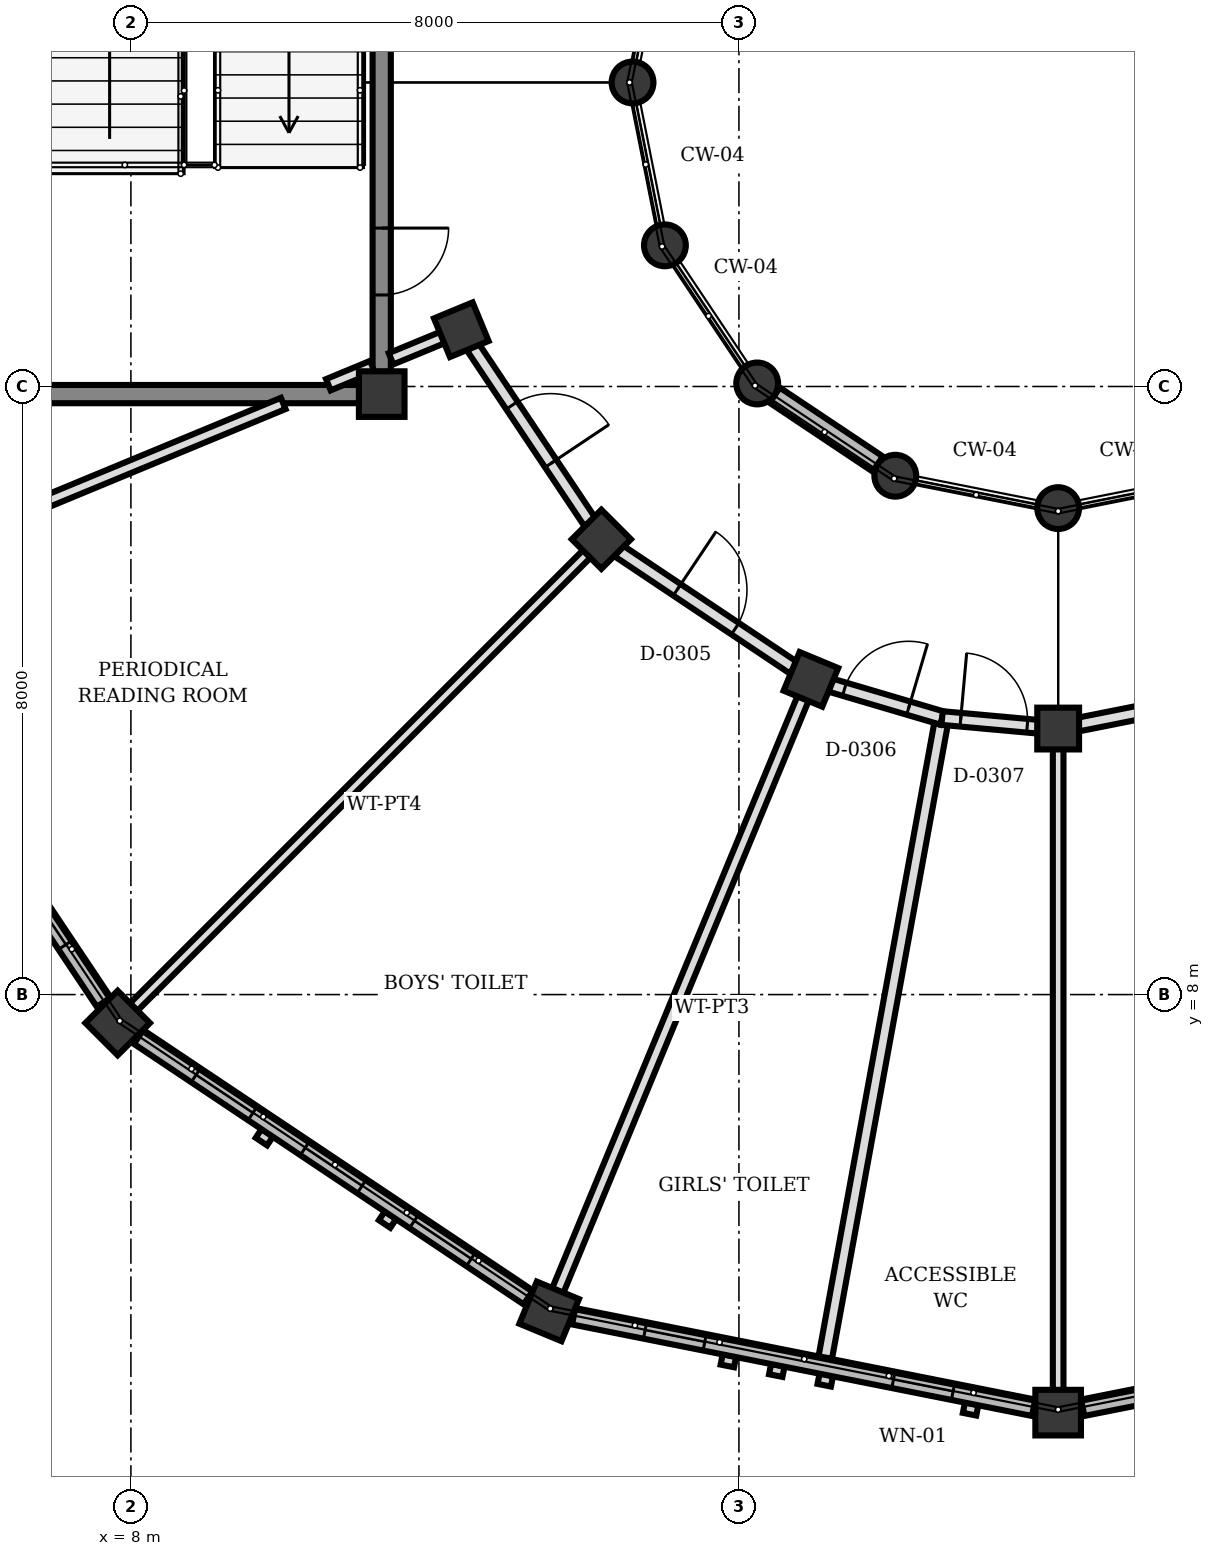
"""IFC4 building model, lengths in metres.
Left out: names, types, materials, properties, quantities, classifications, styles, units other than length and angle.
Written with IfcOpenShell. Run it as: python <this file> out.ifc"""

import sys

from ifc_helpers import new_model, si_unit, direction, frame, frame_2d, origin, origin_2d, place, context, subcontext, project, spatial, rectangle, circle, extrude, element, fill, save


model = new_model("IFC4")
c1 = context("Model", 3, precision=1e-05, world=origin(), true_north=direction((0.0, 1.0)))
c2 = subcontext(c1, "Body", "Model", "MODEL_VIEW")
j1 = project(units=[si_unit("LENGTHUNIT", "METRE"), si_unit("PLANEANGLEUNIT", "RADIAN")], contexts=[c1])
p1 = place(None, origin())
s1 = spatial("IfcSite", under=j1, at=p1, CompositionType="ELEMENT")
p2 = place(p1, origin())
s2 = spatial("IfcBuilding", under=s1, at=p2, CompositionType="ELEMENT")
p3 = place(p2, frame((0.0, 0.0, 8.5)))
s3 = spatial("IfcBuildingStorey", under=s2, at=p3, CompositionType="ELEMENT", Elevation=8.5)
p4 = place(p3, frame((11.3, 15.9, 0.0), z_axis=(0.0, 0.0, 1.0), x_axis=(1.0, 0.0, 0.0)))
e1 = element("IfcColumn", 1, at=p4, inside=s3, PredefinedType="COLUMN", context=c2, shape_type="SweptSolid", body=[
    extrude(rectangle(XDim=0.6, YDim=0.6, at=origin_2d()), origin(), (0.0, 0.0, 1.0), 4.0),
])
for number, where, z_axis, x_axis in (
    (2, (14.6, 20.0, 0.0), (0.0, 0.0, 1.0), (1.0, 0.0, 0.0)),
    (3, (15.026, 17.857, 0.0), (0.0, 0.0, 1.0), (1.0, 0.0, 0.0)),
    (4, (16.24, 16.04, 0.0), (0.0, 0.0, 1.0), (1.0, 0.0, 0.0)),
    (5, (18.057, 14.826, 0.0), (0.0, 0.0, 1.0), (1.0, 0.0, 0.0)),
    (6, (20.2, 14.4, 0.0), (0.0, 0.0, 1.0), (1.0, 0.0, 0.0)),
):
    element("IfcColumn", number, at=place(p3, frame(where, z_axis=z_axis, x_axis=x_axis)), inside=s3, PredefinedType="COLUMN", context=c2, shape_type="SweptSolid", body=[
        extrude(circle(Radius=0.275, at=origin_2d()), origin(), (0.0, 0.0, 1.0), 4.0),
    ])
for number, where, z_axis, x_axis in (
    (7, (12.347, 16.747, 0.0), (0.0, 0.0, 1.0), (-0.924, -0.383, 0.0)),
    (8, (14.19, 13.99, 0.0), (0.0, 0.0, 1.0), (-0.707, -0.707, 0.0)),
    (9, (16.947, 12.147, 0.0), (0.0, 0.0, 1.0), (-0.383, -0.924, 0.0)),
    (10, (20.2, 11.5, 0.0), (0.0, 0.0, 1.0), (0.0, -1.0, 0.0)),
):
    element("IfcColumn", number, at=place(p3, frame(where, z_axis=z_axis, x_axis=x_axis)), inside=s3, PredefinedType="COLUMN", context=c2, shape_type="SweptSolid", body=[
        extrude(rectangle(XDim=0.55, YDim=0.55, at=origin_2d()), origin(), (0.0, 0.0, 1.0), 4.0),
    ])
for number, where, z_axis, x_axis in (
    (11, (7.826, 7.626, 0.0), (0.0, 0.0, 1.0), (-0.707, -0.707, 0.0)),
    (12, (13.503, 3.832, 0.0), (0.0, 0.0, 1.0), (-0.383, -0.924, 0.0)),
    (13, (20.2, 2.5, 0.0), (0.0, 0.0, 1.0), (0.0, -1.0, 0.0)),
):
    element("IfcColumn", number, at=place(p3, frame(where, z_axis=z_axis, x_axis=x_axis)), inside=s3, PredefinedType="COLUMN", context=c2, shape_type="SweptSolid", body=[
        extrude(rectangle(XDim=0.6, YDim=0.6, at=origin_2d()), origin(), (0.0, 0.0, 1.0), 4.0),
    ])
p5 = place(p3, frame((7.643, 7.9, 0.0), z_axis=(0.0, 0.0, 1.0), x_axis=(-0.555658736667, 0.831410469242, 0.0)))
e14 = element("IfcWall", 14, at=p5, inside=s3, PredefinedType="SOLIDWALL", context=c2, shape_type="SweptSolid", body=[
    extrude(rectangle(XDim=6.169, YDim=0.22, at=frame_2d((3.084, 0.0))), origin(), (0.0, 0.0, 1.0), 3.172),
])
p6 = place(p5, frame((0.907, 0.0, 0.85)))
e15 = element("IfcOpeningElement", 15, at=p6, cuts=e14, PredefinedType="OPENING", context=c2, shape_type="SweptSolid", body=[
    extrude(rectangle(XDim=0.9, YDim=1.4, at=frame_2d((0.45, 0.7))), frame((0.0, 0.12, 0.0), z_axis=(0.0, -1.0, 0.0), x_axis=(1.0, 0.0, 0.0)), (0.0, 0.0, 1.0), 0.24),
])
p7 = place(p5, frame((2.635, 0.0, 0.85)))
e16 = element("IfcOpeningElement", 16, at=p7, cuts=e14, PredefinedType="OPENING", context=c2, shape_type="SweptSolid", body=[
    extrude(rectangle(XDim=0.9, YDim=1.4, at=frame_2d((0.45, 0.7))), frame((0.0, 0.12, 0.0), z_axis=(0.0, -1.0, 0.0), x_axis=(1.0, 0.0, 0.0)), (0.0, 0.0, 1.0), 0.24),
])
p8 = place(p5, frame((4.362, 0.0, 0.85)))
e17 = element("IfcOpeningElement", 17, at=p8, cuts=e14, PredefinedType="OPENING", context=c2, shape_type="SweptSolid", body=[
    extrude(rectangle(XDim=0.9, YDim=1.4, at=frame_2d((0.45, 0.7))), frame((0.0, 0.12, 0.0), z_axis=(0.0, -1.0, 0.0), x_axis=(1.0, 0.0, 0.0)), (0.0, 0.0, 1.0), 0.24),
])
p9 = place(p3, frame((13.229, 4.015, 0.0), z_axis=(0.0, 0.0, 1.0), x_axis=(-0.831379966495, 0.555704374025, 0.0)))
e18 = element("IfcWall", 18, at=p9, inside=s3, PredefinedType="SOLIDWALL", context=c2, shape_type="SweptSolid", body=[
    extrude(rectangle(XDim=6.169, YDim=0.22, at=frame_2d((3.084, 0.0))), origin(), (0.0, 0.0, 1.0), 3.172),
])
p10 = place(p9, frame((0.907, 0.0, 0.85)))
e19 = element("IfcOpeningElement", 19, at=p10, cuts=e18, PredefinedType="OPENING", context=c2, shape_type="SweptSolid", body=[
    extrude(rectangle(XDim=0.9, YDim=1.4, at=frame_2d((0.45, 0.7))), frame((0.0, 0.12, 0.0), z_axis=(0.0, -1.0, 0.0), x_axis=(1.0, 0.0, 0.0)), (0.0, 0.0, 1.0), 0.24),
])
p11 = place(p9, frame((2.635, 0.0, 0.85)))
e20 = element("IfcOpeningElement", 20, at=p11, cuts=e18, PredefinedType="OPENING", context=c2, shape_type="SweptSolid", body=[
    extrude(rectangle(XDim=0.9, YDim=1.4, at=frame_2d((0.45, 0.7))), frame((0.0, 0.12, 0.0), z_axis=(0.0, -1.0, 0.0), x_axis=(1.0, 0.0, 0.0)), (0.0, 0.0, 1.0), 0.24),
])
p12 = place(p9, frame((4.362, 0.0, 0.85)))
e21 = element("IfcOpeningElement", 21, at=p12, cuts=e18, PredefinedType="OPENING", context=c2, shape_type="SweptSolid", body=[
    extrude(rectangle(XDim=0.9, YDim=1.4, at=frame_2d((0.45, 0.7))), frame((0.0, 0.12, 0.0), z_axis=(0.0, -1.0, 0.0), x_axis=(1.0, 0.0, 0.0)), (0.0, 0.0, 1.0), 0.24),
])
p13 = place(p3, frame((16.47, 15.886, 0.0), z_axis=(0.0, 0.0, 1.0), x_axis=(0.83165874011, -0.555287078904, 0.0)))
e22 = element("IfcWall", 22, at=p13, inside=s3, PredefinedType="SOLIDWALL", context=c2, shape_type="SweptSolid", body=[
    extrude(rectangle(XDim=1.632, YDim=0.24, at=frame_2d((0.816, 0.0))), origin(), (0.0, 0.0, 1.0), 3.222),
])
p14 = place(p3, frame((19.877, 2.564, 0.0), z_axis=(0.0, 0.0, 1.0), x_axis=(-0.980770460131, 0.195164813773, 0.0)))
e23 = element("IfcWall", 23, at=p14, inside=s3, PredefinedType="SOLIDWALL", context=c2, shape_type="SweptSolid", body=[
    extrude(rectangle(XDim=6.17, YDim=0.22, at=frame_2d((3.085, 0.0))), origin(), (0.0, 0.0, 1.0), 3.172),
])
p15 = place(p14, frame((1.081, 0.0, 1.15)))
e24 = element("IfcOpeningElement", 24, at=p15, cuts=e23, PredefinedType="OPENING", context=c2, shape_type="SweptSolid", body=[
    extrude(rectangle(XDim=0.8, YDim=1.1, at=frame_2d((0.4, 0.55))), frame((0.0, 0.12, 0.0), z_axis=(0.0, -1.0, 0.0), x_axis=(1.0, 0.0, 0.0)), (0.0, 0.0, 1.0), 0.24),
])
p16 = place(p14, frame((4.412, 0.0, 1.15)))
e25 = element("IfcOpeningElement", 25, at=p16, cuts=e23, PredefinedType="OPENING", context=c2, shape_type="SweptSolid", body=[
    extrude(rectangle(XDim=0.8, YDim=1.1, at=frame_2d((0.4, 0.55))), frame((0.0, 0.12, 0.0), z_axis=(0.0, -1.0, 0.0), x_axis=(1.0, 0.0, 0.0)), (0.0, 0.0, 1.0), 0.24),
])
p17 = place(p3, frame((26.574, 3.768, 0.0), z_axis=(0.0, 0.0, 1.0), x_axis=(-0.980770460131, -0.195164813773, 0.0)))
e26 = element("IfcWall", 26, at=p17, inside=s3, PredefinedType="SOLIDWALL", context=c2, shape_type="SweptSolid", body=[
    extrude(rectangle(XDim=6.17, YDim=0.22, at=frame_2d((3.085, 0.0))), origin(), (0.0, 0.0, 1.0), 3.172),
])
p18 = place(p17, frame((0.907, 0.0, 0.85)))
e27 = element("IfcOpeningElement", 27, at=p18, cuts=e26, PredefinedType="OPENING", context=c2, shape_type="SweptSolid", body=[
    extrude(rectangle(XDim=0.9, YDim=1.4, at=frame_2d((0.45, 0.7))), frame((0.0, 0.12, 0.0), z_axis=(0.0, -1.0, 0.0), x_axis=(1.0, 0.0, 0.0)), (0.0, 0.0, 1.0), 0.24),
])
p19 = place(p17, frame((2.635, 0.0, 0.85)))
e28 = element("IfcOpeningElement", 28, at=p19, cuts=e26, PredefinedType="OPENING", context=c2, shape_type="SweptSolid", body=[
    extrude(rectangle(XDim=0.9, YDim=1.4, at=frame_2d((0.45, 0.7))), frame((0.0, 0.12, 0.0), z_axis=(0.0, -1.0, 0.0), x_axis=(1.0, 0.0, 0.0)), (0.0, 0.0, 1.0), 0.24),
])
p20 = place(p17, frame((4.362, 0.0, 0.85)))
e29 = element("IfcOpeningElement", 29, at=p20, cuts=e26, PredefinedType="OPENING", context=c2, shape_type="SweptSolid", body=[
    extrude(rectangle(XDim=0.9, YDim=1.4, at=frame_2d((0.45, 0.7))), frame((0.0, 0.12, 0.0), z_axis=(0.0, -1.0, 0.0), x_axis=(1.0, 0.0, 0.0)), (0.0, 0.0, 1.0), 0.24),
])
p21 = place(p3, frame((11.3, 24.328, 0.0), z_axis=(0.0, 0.0, 1.0), x_axis=(0.0, -1.0, 0.0)))
e30 = element("IfcWall", 30, at=p21, inside=s3, PredefinedType="SHEAR", context=c2, shape_type="SweptSolid", body=[
    extrude(rectangle(XDim=8.136, YDim=0.24, at=frame_2d((4.068, 0.0))), origin(), (0.0, 0.0, 1.0), 3.74),
])
p22 = place(p21, frame((6.244, 0.0, 0.0)))
e31 = element("IfcOpeningElement", 31, at=p22, cuts=e30, PredefinedType="OPENING", context=c2, shape_type="SweptSolid", body=[
    extrude(rectangle(XDim=0.88, YDim=2.1, at=frame_2d((0.44, 1.05))), frame((0.0, 0.13, 0.0), z_axis=(0.0, -1.0, 0.0), x_axis=(1.0, 0.0, 0.0)), (0.0, 0.0, 1.0), 0.26),
])
p23 = place(p3, frame((11.008, 15.9, 0.0), z_axis=(0.0, 0.0, 1.0), x_axis=(-1.0, 0.0, 0.0)))
e32 = element("IfcWall", 32, at=p23, inside=s3, PredefinedType="SHEAR", context=c2, shape_type="SweptSolid", body=[
    extrude(rectangle(XDim=4.216, YDim=0.24, at=frame_2d((2.108, 0.0))), origin(), (0.0, 0.0, 1.0), 3.74),
])
p24 = place(p3, frame((12.1, 16.645, 0.0), z_axis=(0.0, 0.0, 1.0), x_axis=(-0.924069600435, -0.382224245113, 0.0)))
e33 = element("IfcWall", 33, at=p24, inside=s3, PredefinedType="PARTITIONING", context=c2, shape_type="SweptSolid", body=[
    extrude(rectangle(XDim=0.733, YDim=0.16, at=frame_2d((0.366, 0.0))), origin(), (0.0, 0.0, 1.0), 3.072),
])
p25 = place(p3, frame((11.177, 16.263, 0.0), z_axis=(0.0, 0.0, 1.0), x_axis=(-0.923812676193, -0.382844797933, 0.0)))
e34 = element("IfcWall", 34, at=p25, inside=s3, PredefinedType="PARTITIONING", context=c2, shape_type="SweptSolid", body=[
    extrude(rectangle(XDim=0.627, YDim=0.16, at=frame_2d((0.313, 0.0))), origin(), (0.0, 0.0, 1.0), 3.072),
])
p26 = place(p3, frame((10.004, 15.777, 0.0), z_axis=(0.0, 0.0, 1.0), x_axis=(-0.923864955254, -0.382718623082, 0.0)))
e35 = element("IfcWall", 35, at=p26, inside=s3, PredefinedType="PARTITIONING", context=c2, shape_type="SweptSolid", body=[
    extrude(rectangle(XDim=6.172, YDim=0.16, at=frame_2d((3.086, 0.0))), origin(), (0.0, 0.0, 1.0), 3.072),
])
p27 = place(p3, frame((14.001, 13.801, 0.0), z_axis=(0.0, 0.0, 1.0), x_axis=(-0.707106781187, -0.707106781187, 0.0)))
e36 = element("IfcWall", 36, at=p27, inside=s3, PredefinedType="PARTITIONING", context=c2, shape_type="SweptSolid", body=[
    extrude(rectangle(XDim=8.441, YDim=0.14, at=frame_2d((4.221, 0.0))), origin(), (0.0, 0.0, 1.0), 3.072),
])
p28 = place(p3, frame((16.845, 11.9, 0.0), z_axis=(0.0, 0.0, 1.0), x_axis=(-0.382683896966, -0.923879340067, 0.0)))
e37 = element("IfcWall", 37, at=p28, inside=s3, PredefinedType="PARTITIONING", context=c2, shape_type="SweptSolid", body=[
    extrude(rectangle(XDim=8.44, YDim=0.16, at=frame_2d((4.22, 0.0))), origin(), (0.0, 0.0, 1.0), 3.072),
])
p29 = place(p3, frame((20.2, 11.233, 0.0), z_axis=(0.0, 0.0, 1.0), x_axis=(0.0, -1.0, 0.0)))
e38 = element("IfcWall", 38, at=p29, inside=s3, PredefinedType="PARTITIONING", context=c2, shape_type="SweptSolid", body=[
    extrude(rectangle(XDim=8.441, YDim=0.14, at=frame_2d((4.22, 0.0))), origin(), (0.0, 0.0, 1.0), 3.072),
])
p30 = place(p3, frame((18.673, 11.638, 0.0), z_axis=(0.0, 0.0, 1.0), x_axis=(-0.179734485707, -0.983715159306, 0.0)))
e39 = element("IfcWall", 39, at=p30, inside=s3, PredefinedType="PARTITIONING", context=c2, shape_type="SweptSolid", body=[
    extrude(rectangle(XDim=8.552, YDim=0.18, at=frame_2d((4.276, 0.0))), origin(), (0.0, 0.0, 1.0), 3.072),
])
p31 = place(p3, frame((12.498, 16.521, 0.0), z_axis=(0.0, 0.0, 1.0), x_axis=(0.555797002478, -0.831318045056, 0.0)))
e40 = element("IfcWall", 40, at=p31, inside=s3, PredefinedType="PARTITIONING", context=c2, shape_type="SweptSolid", body=[
    extrude(rectangle(XDim=2.773, YDim=0.18, at=frame_2d((1.386, 0.0))), origin(), (0.0, 0.0, 1.0), 3.072),
])
p32 = place(p31, frame((0.926, 0.0, 0.0)))
e41 = element("IfcOpeningElement", 41, at=p32, cuts=e40, PredefinedType="OPENING", context=c2, shape_type="SweptSolid", body=[
    extrude(rectangle(XDim=0.92, YDim=2.1, at=frame_2d((0.46, 1.05))), frame((0.0, 0.1, 0.0), z_axis=(0.0, -1.0, 0.0), x_axis=(1.0, 0.0, 0.0)), (0.0, 0.0, 1.0), 0.2),
])
p33 = place(p3, frame((14.416, 13.839, 0.0), z_axis=(0.0, 0.0, 1.0), x_axis=(0.831318045056, -0.555797002478, 0.0)))
e42 = element("IfcWall", 42, at=p33, inside=s3, PredefinedType="PARTITIONING", context=c2, shape_type="SweptSolid", body=[
    extrude(rectangle(XDim=2.773, YDim=0.18, at=frame_2d((1.386, 0.0))), origin(), (0.0, 0.0, 1.0), 3.072),
])
p34 = place(p33, frame((0.926, 0.0, 0.0)))
e43 = element("IfcOpeningElement", 43, at=p34, cuts=e42, PredefinedType="OPENING", context=c2, shape_type="SweptSolid", body=[
    extrude(rectangle(XDim=0.92, YDim=2.1, at=frame_2d((0.46, 1.05))), frame((0.0, 0.1, 0.0), z_axis=(0.0, -1.0, 0.0), x_axis=(1.0, 0.0, 0.0)), (0.0, 0.0, 1.0), 0.2),
])
p35 = place(p3, frame((17.205, 12.071, 0.0), z_axis=(0.0, 0.0, 1.0), x_axis=(0.959128949513, -0.282969359128, 0.0)))
e44 = element("IfcWall", 44, at=p35, inside=s3, PredefinedType="PARTITIONING", context=c2, shape_type="SweptSolid", body=[
    extrude(rectangle(XDim=1.531, YDim=0.18, at=frame_2d((0.765, 0.0))), origin(), (0.0, 0.0, 1.0), 3.072),
])
p36 = place(p35, frame((0.191, 0.0, 0.0)))
e45 = element("IfcOpeningElement", 45, at=p36, cuts=e44, PredefinedType="OPENING", context=c2, shape_type="SweptSolid", body=[
    extrude(rectangle(XDim=0.88, YDim=2.1, at=frame_2d((0.44, 1.05))), frame((0.0, 0.1, 0.0), z_axis=(0.0, -1.0, 0.0), x_axis=(1.0, 0.0, 0.0)), (0.0, 0.0, 1.0), 0.2),
])
p37 = place(p3, frame((18.673, 11.638, 0.0), z_axis=(0.0, 0.0, 1.0), x_axis=(0.995931080725, -0.090118158244, 0.0)))
e46 = element("IfcWall", 46, at=p37, inside=s3, PredefinedType="PARTITIONING", context=c2, shape_type="SweptSolid", body=[
    extrude(rectangle(XDim=1.265, YDim=0.18, at=frame_2d((0.633, 0.0))), origin(), (0.0, 0.0, 1.0), 3.072),
])
p38 = place(p37, frame((0.245, 0.0, 0.0)))
e47 = element("IfcOpeningElement", 47, at=p38, cuts=e46, PredefinedType="OPENING", context=c2, shape_type="SweptSolid", body=[
    extrude(rectangle(XDim=0.88, YDim=2.1, at=frame_2d((0.44, 1.05))), frame((0.0, 0.1, 0.0), z_axis=(0.0, -1.0, 0.0), x_axis=(1.0, 0.0, 0.0)), (0.0, 0.0, 1.0), 0.2),
])
p39 = place(p3, frame((20.467, 11.553, 0.0), z_axis=(0.0, 0.0, 1.0), x_axis=(0.980773264811, 0.195150718759, 0.0)))
e48 = element("IfcWall", 48, at=p39, inside=s3, PredefinedType="PARTITIONING", context=c2, shape_type="SweptSolid", body=[
    extrude(rectangle(XDim=2.772, YDim=0.18, at=frame_2d((1.386, 0.0))), origin(), (0.0, 0.0, 1.0), 3.072),
])
p40 = place(p39, frame((0.926, 0.0, 0.0)))
e49 = element("IfcOpeningElement", 49, at=p40, cuts=e48, PredefinedType="OPENING", context=c2, shape_type="SweptSolid", body=[
    extrude(rectangle(XDim=0.92, YDim=2.1, at=frame_2d((0.46, 1.05))), frame((0.0, 0.1, 0.0), z_axis=(0.0, -1.0, 0.0), x_axis=(1.0, 0.0, 0.0)), (0.0, 0.0, 1.0), 0.2),
])
p41 = place(p6, origin())
e50 = element("IfcWindow", 50, at=p41, inside=s3, PartitioningType="SINGLE_PANEL", PredefinedType="WINDOW", context=c2, shape_type="SweptSolid", body=[
    extrude(rectangle(XDim=0.9, YDim=1.4, at=frame_2d((0.45, 0.7))), frame((0.0, 0.03, 0.0), z_axis=(0.0, -1.0, 0.0), x_axis=(1.0, 0.0, 0.0)), (0.0, 0.0, 1.0), 0.06),
])
fill(e15, e50)
p42 = place(p10, origin())
e51 = element("IfcWindow", 51, at=p42, inside=s3, PartitioningType="SINGLE_PANEL", PredefinedType="WINDOW", context=c2, shape_type="SweptSolid", body=[
    extrude(rectangle(XDim=0.9, YDim=1.4, at=frame_2d((0.45, 0.7))), frame((0.0, 0.03, 0.0), z_axis=(0.0, -1.0, 0.0), x_axis=(1.0, 0.0, 0.0)), (0.0, 0.0, 1.0), 0.06),
])
fill(e19, e51)
p43 = place(p11, origin())
e52 = element("IfcWindow", 52, at=p43, inside=s3, PartitioningType="SINGLE_PANEL", PredefinedType="WINDOW", context=c2, shape_type="SweptSolid", body=[
    extrude(rectangle(XDim=0.9, YDim=1.4, at=frame_2d((0.45, 0.7))), frame((0.0, 0.03, 0.0), z_axis=(0.0, -1.0, 0.0), x_axis=(1.0, 0.0, 0.0)), (0.0, 0.0, 1.0), 0.06),
])
fill(e20, e52)
p44 = place(p12, origin())
e53 = element("IfcWindow", 53, at=p44, inside=s3, PartitioningType="SINGLE_PANEL", PredefinedType="WINDOW", context=c2, shape_type="SweptSolid", body=[
    extrude(rectangle(XDim=0.9, YDim=1.4, at=frame_2d((0.45, 0.7))), frame((0.0, 0.03, 0.0), z_axis=(0.0, -1.0, 0.0), x_axis=(1.0, 0.0, 0.0)), (0.0, 0.0, 1.0), 0.06),
])
fill(e21, e53)
p45 = place(p15, origin())
e54 = element("IfcWindow", 54, at=p45, inside=s3, PartitioningType="SINGLE_PANEL", PredefinedType="WINDOW", context=c2, shape_type="SweptSolid", body=[
    extrude(rectangle(XDim=0.8, YDim=1.1, at=frame_2d((0.4, 0.55))), frame((0.0, 0.03, 0.0), z_axis=(0.0, -1.0, 0.0), x_axis=(1.0, 0.0, 0.0)), (0.0, 0.0, 1.0), 0.06),
])
fill(e24, e54)
p46 = place(p16, origin())
e55 = element("IfcWindow", 55, at=p46, inside=s3, PartitioningType="SINGLE_PANEL", PredefinedType="WINDOW", context=c2, shape_type="SweptSolid", body=[
    extrude(rectangle(XDim=0.8, YDim=1.1, at=frame_2d((0.4, 0.55))), frame((0.0, 0.03, 0.0), z_axis=(0.0, -1.0, 0.0), x_axis=(1.0, 0.0, 0.0)), (0.0, 0.0, 1.0), 0.06),
])
fill(e25, e55)
p47 = place(p22, origin())
e56 = element("IfcDoor", 56, at=p47, inside=s3, OperationType="SINGLE_SWING_LEFT", PredefinedType="DOOR", context=c2, shape_type="SweptSolid", body=[
    extrude(rectangle(XDim=0.88, YDim=2.1, at=frame_2d((0.44, 1.05))), frame((0.0, 0.025, 0.0), z_axis=(0.0, -1.0, 0.0), x_axis=(1.0, 0.0, 0.0)), (0.0, 0.0, 1.0), 0.05),
])
fill(e31, e56)
p48 = place(p32, origin())
e57 = element("IfcDoor", 57, at=p48, inside=s3, OperationType="SINGLE_SWING_RIGHT", PredefinedType="DOOR", context=c2, shape_type="SweptSolid", body=[
    extrude(rectangle(XDim=0.92, YDim=2.1, at=frame_2d((0.46, 1.05))), frame((0.0, 0.025, 0.0), z_axis=(0.0, -1.0, 0.0), x_axis=(1.0, 0.0, 0.0)), (0.0, 0.0, 1.0), 0.05),
])
fill(e41, e57)
p49 = place(p34, origin())
e58 = element("IfcDoor", 58, at=p49, inside=s3, OperationType="SINGLE_SWING_LEFT", PredefinedType="DOOR", context=c2, shape_type="SweptSolid", body=[
    extrude(rectangle(XDim=0.92, YDim=2.1, at=frame_2d((0.46, 1.05))), frame((0.0, 0.025, 0.0), z_axis=(0.0, -1.0, 0.0), x_axis=(1.0, 0.0, 0.0)), (0.0, 0.0, 1.0), 0.05),
])
fill(e43, e58)
p50 = place(p36, origin())
e59 = element("IfcDoor", 59, at=p50, inside=s3, OperationType="SINGLE_SWING_RIGHT", PredefinedType="DOOR", context=c2, shape_type="SweptSolid", body=[
    extrude(rectangle(XDim=0.88, YDim=2.1, at=frame_2d((0.44, 1.05))), frame((0.0, 0.025, 0.0), z_axis=(0.0, -1.0, 0.0), x_axis=(1.0, 0.0, 0.0)), (0.0, 0.0, 1.0), 0.05),
])
fill(e45, e59)
p51 = place(p38, origin())
e60 = element("IfcDoor", 60, at=p51, inside=s3, OperationType="SINGLE_SWING_LEFT", PredefinedType="DOOR", context=c2, shape_type="SweptSolid", body=[
    extrude(rectangle(XDim=0.88, YDim=2.1, at=frame_2d((0.44, 1.05))), frame((0.0, 0.025, 0.0), z_axis=(0.0, -1.0, 0.0), x_axis=(1.0, 0.0, 0.0)), (0.0, 0.0, 1.0), 0.05),
])
fill(e47, e60)
save(model, sys.argv[1])
